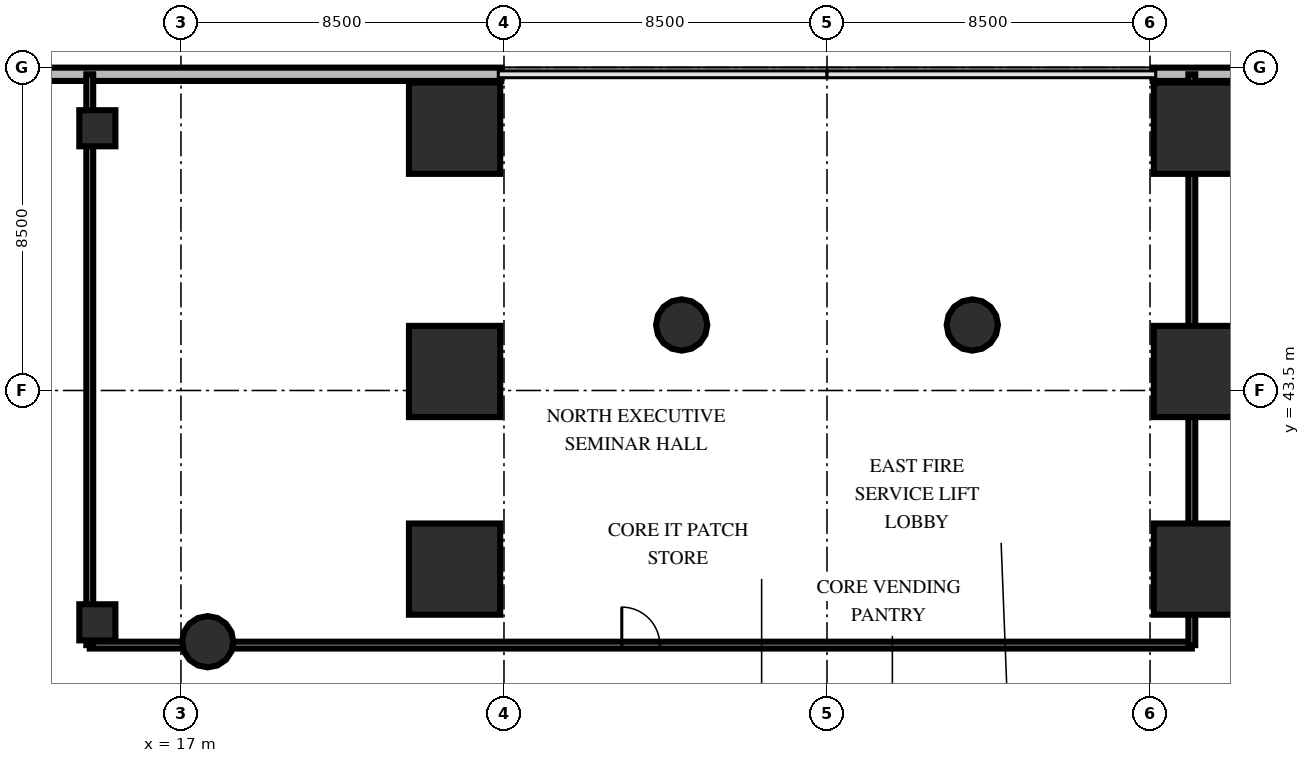
"""IFC4 building model, lengths in metres.
Left out: names, types, materials, properties, quantities, classifications, styles, units other than length and angle.
Written with IfcOpenShell. Run it as: python <this file> out.ifc"""

import sys

from ifc_helpers import new_model, si_unit, direction, frame, frame_2d, origin, origin_2d, place, context, subcontext, project, spatial, rectangle, circle, extrude, element, fill, save


model = new_model("IFC4")
c1 = context("Model", 3, precision=1e-05, world=origin(), true_north=direction((0.0, 1.0)))
c2 = subcontext(c1, "Body", "Model", "MODEL_VIEW")
j1 = project(units=[si_unit("LENGTHUNIT", "METRE"), si_unit("PLANEANGLEUNIT", "RADIAN")], contexts=[c1])
p1 = place(None, origin())
s1 = spatial("IfcSite", under=j1, at=p1, CompositionType="ELEMENT")
p2 = place(p1, origin())
s2 = spatial("IfcBuilding", under=s1, at=p2, CompositionType="ELEMENT")
p3 = place(p2, frame((0.0, 0.0, 25.2)))
s3 = spatial("IfcBuildingStorey", under=s2, at=p3, CompositionType="ELEMENT", Elevation=25.2)
for number, where, z_axis, x_axis in (
    (1, (24.2, 38.8, 0.0), (0.0, 0.0, 1.0), (1.0, 0.0, 0.0)),
    (2, (24.2, 44.0, 0.0), (0.0, 0.0, 1.0), (1.0, 0.0, 0.0)),
    (3, (24.2, 50.4, 0.0), (0.0, 0.0, 1.0), (1.0, 0.0, 0.0)),
    (4, (43.8, 38.8, 0.0), (0.0, 0.0, 1.0), (1.0, 0.0, 0.0)),
    (5, (43.8, 44.0, 0.0), (0.0, 0.0, 1.0), (1.0, 0.0, 0.0)),
    (6, (43.8, 50.4, 0.0), (0.0, 0.0, 1.0), (1.0, 0.0, 0.0)),
):
    element("IfcColumn", number, at=place(p3, frame(where, z_axis=z_axis, x_axis=x_axis)), inside=s3, PredefinedType="USERDEFINED", context=c2, shape_type="SweptSolid", body=[
        extrude(rectangle(XDim=2.4, YDim=2.4, at=origin_2d()), origin(), (0.0, 0.0, 1.0), 4.52),
    ])
for number, where, z_axis, x_axis in (
    (7, (14.8, 37.4, 0.0), (0.0, 0.0, 1.0), (1.0, 0.0, 0.0)),
    (8, (14.8, 50.4, 0.0), (0.0, 0.0, 1.0), (1.0, 0.0, 0.0)),
):
    element("IfcColumn", number, at=place(p3, frame(where, z_axis=z_axis, x_axis=x_axis)), inside=s3, PredefinedType="COLUMN", context=c2, shape_type="SweptSolid", body=[
        extrude(rectangle(XDim=0.95, YDim=0.95, at=origin_2d()), origin(), (0.0, 0.0, 1.0), 4.8),
    ])
for number, where, z_axis, x_axis in (
    (9, (37.824, 45.223, 0.0), (0.0, 0.0, 1.0), (1.0, 0.0, 0.0)),
    (10, (30.176, 45.223, 0.0), (0.0, 0.0, 1.0), (1.0, 0.0, 0.0)),
    (11, (17.703, 36.889, 0.0), (0.0, 0.0, 1.0), (1.0, 0.0, 0.0)),
):
    element("IfcColumn", number, at=place(p3, frame(where, z_axis=z_axis, x_axis=x_axis)), inside=s3, PredefinedType="COLUMN", context=c2, shape_type="SweptSolid", body=[
        extrude(circle(Radius=0.675, at=origin_2d()), origin(), (0.0, 0.0, 1.0), 4.8),
    ])
p4 = place(p3, frame((0.01, 51.82, 0.0), z_axis=(0.0, 0.0, 1.0), x_axis=(1.0, 0.0, 0.0)))
e12 = element("IfcWall", 12, at=p4, inside=s3, PredefinedType="SOLIDWALL", context=c2, shape_type="SweptSolid", body=[
    extrude(rectangle(XDim=25.42, YDim=0.35, at=frame_2d((12.71, 0.0))), origin(), (0.0, 0.0, 1.0), 3.8),
])
p5 = place(p4, frame((3.2, 0.0, 0.85)))
e13 = element("IfcOpeningElement", 13, at=p5, cuts=e12, PredefinedType="OPENING", context=c2, shape_type="SweptSolid", body=[
    extrude(rectangle(XDim=2.4, YDim=2.4, at=frame_2d((1.2, 1.2))), frame((0.0, 0.185, 0.0), z_axis=(0.0, -1.0, 0.0), x_axis=(1.0, 0.0, 0.0)), (0.0, 0.0, 1.0), 0.37),
])
p6 = place(p3, frame((42.57, 51.82, 0.0), z_axis=(0.0, 0.0, 1.0), x_axis=(1.0, 0.0, 0.0)))
e14 = element("IfcWall", 14, at=p6, inside=s3, PredefinedType="SOLIDWALL", context=c2, shape_type="SweptSolid", body=[
    extrude(rectangle(XDim=25.42, YDim=0.35, at=frame_2d((12.71, 0.0))), origin(), (0.0, 0.0, 1.0), 3.8),
])
p7 = place(p6, frame((13.55, 0.0, 0.85)))
e15 = element("IfcOpeningElement", 15, at=p7, cuts=e14, PredefinedType="OPENING", context=c2, shape_type="SweptSolid", body=[
    extrude(rectangle(XDim=2.4, YDim=2.4, at=frame_2d((1.2, 1.2))), frame((0.0, 0.185, 0.0), z_axis=(0.0, -1.0, 0.0), x_axis=(1.0, 0.0, 0.0)), (0.0, 0.0, 1.0), 0.37),
])
p8 = place(p3, frame((14.6, 36.8, 0.0), z_axis=(0.0, 0.0, 1.0), x_axis=(1.0, 0.0, 0.0)))
e16 = element("IfcWall", 16, at=p8, inside=s3, PredefinedType="PARTITIONING", context=c2, shape_type="SweptSolid", body=[
    extrude(rectangle(XDim=29.0, YDim=0.18, at=frame_2d((14.5, 0.0))), origin(), (0.0, 0.0, 1.0), 3.6),
])
p9 = place(p8, frame((14.0, 0.0, 0.0)))
e17 = element("IfcOpeningElement", 17, at=p9, cuts=e16, PredefinedType="OPENING", context=c2, shape_type="SweptSolid", body=[
    extrude(rectangle(XDim=1.0, YDim=2.15, at=frame_2d((0.5, 1.075))), frame((0.0, 0.1, 0.0), z_axis=(0.0, -1.0, 0.0), x_axis=(1.0, 0.0, 0.0)), (0.0, 0.0, 1.0), 0.2),
])
for number, where, z_axis, x_axis in (
    (18, (43.6, 36.8, 0.0), (0.0, 0.0, 1.0), (0.0, 1.0, 0.0)),
    (19, (14.6, 51.82, 0.0), (0.0, 0.0, 1.0), (0.0, -1.0, 0.0)),
):
    element("IfcWall", number, at=place(p3, frame(where, z_axis=z_axis, x_axis=x_axis)), inside=s3, PredefinedType="PARTITIONING", context=c2, shape_type="SweptSolid", body=[
        extrude(rectangle(XDim=15.02, YDim=0.18, at=frame_2d((7.51, 0.0))), origin(), (0.0, 0.0, 1.0), 3.6),
    ])
p10 = place(p9, origin())
e20 = element("IfcDoor", 20, at=p10, inside=s3, OperationType="SINGLE_SWING_LEFT", PredefinedType="DOOR", context=c2, shape_type="SweptSolid", body=[
    extrude(rectangle(XDim=1.0, YDim=2.15, at=frame_2d((0.5, 1.075))), frame((0.0, 0.025, 0.0), z_axis=(0.0, -1.0, 0.0), x_axis=(1.0, 0.0, 0.0)), (0.0, 0.0, 1.0), 0.05),
])
fill(e17, e20)
save(model, sys.argv[1])
